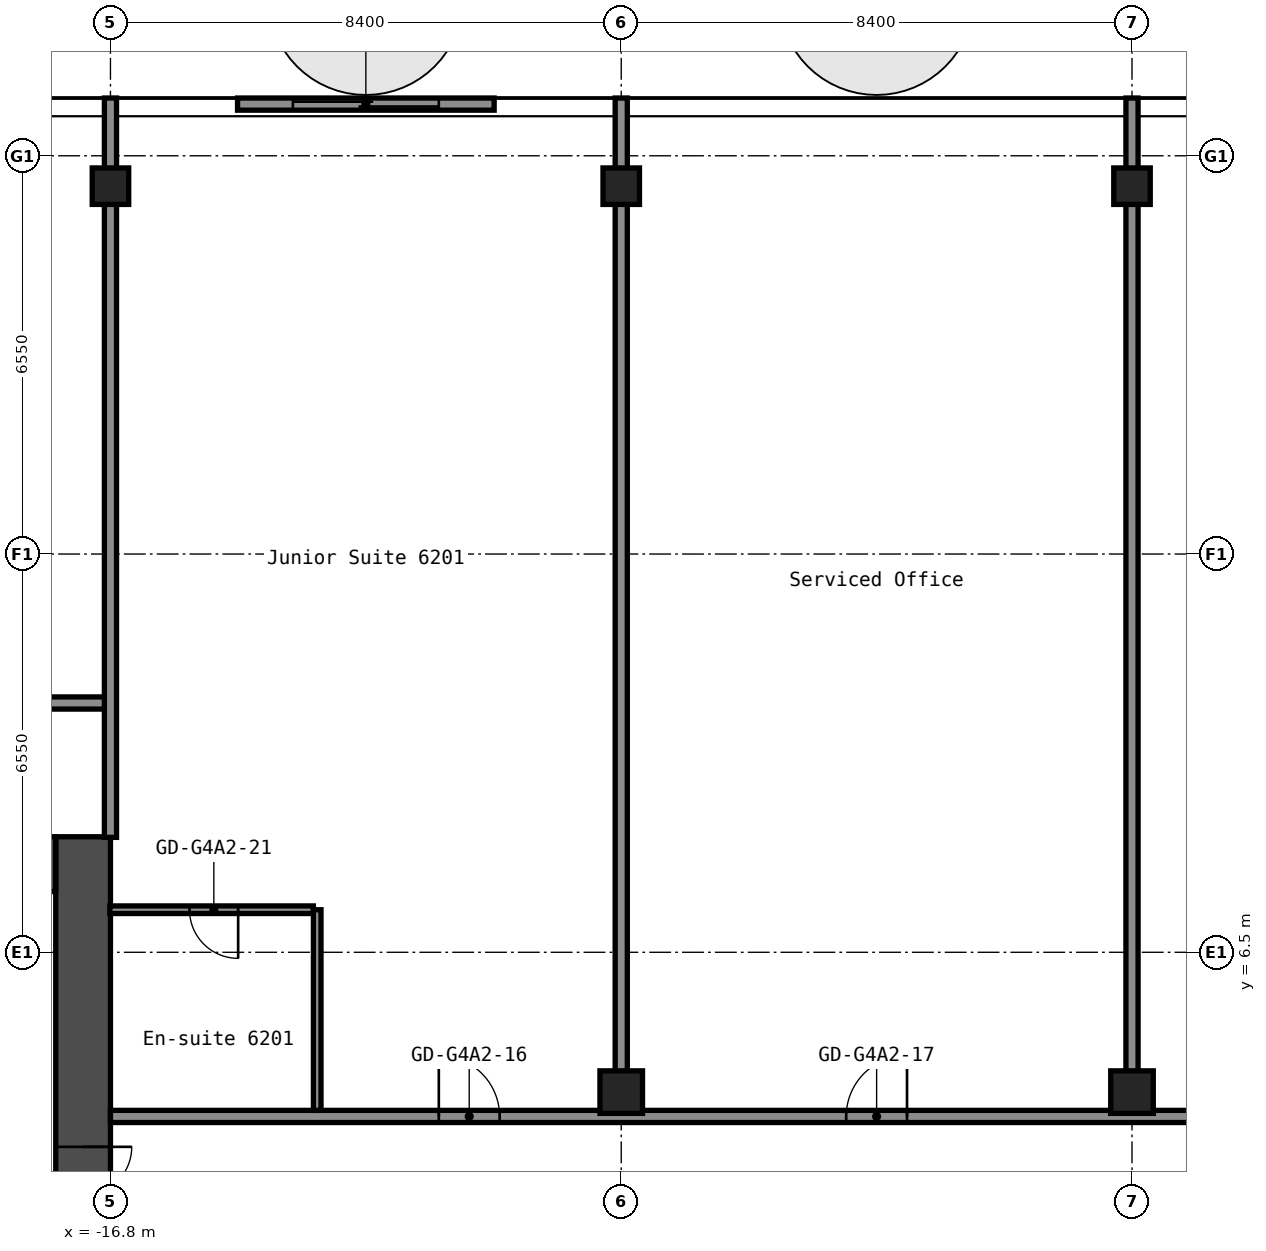
"""IFC4 building model, lengths in metres.
Left out: names, types, materials, properties, quantities, classifications, styles, units other than length and angle.
Written with IfcOpenShell. Run it as: python <this file> out.ifc"""

import sys

from ifc_helpers import new_model, si_unit, direction, frame, frame_2d, origin, origin_2d, place, context, subcontext, project, spatial, rectangle, hollow_rectangle, extrude, element, fill, save


model = new_model("IFC4")
c1 = context("Model", 3, precision=1e-05, world=origin(), true_north=direction((0.0, 1.0)))
c2 = subcontext(c1, "Body", "Model", "MODEL_VIEW")
j1 = project(units=[si_unit("LENGTHUNIT", "METRE"), si_unit("PLANEANGLEUNIT", "RADIAN")], contexts=[c1])
p1 = place(None, origin())
s1 = spatial("IfcSite", under=j1, at=p1, CompositionType="ELEMENT")
p2 = place(p1, origin())
s2 = spatial("IfcBuilding", under=s1, at=p2, CompositionType="ELEMENT")
p3 = place(p2, frame((0.0, 0.0, 218.6)))
s3 = spatial("IfcBuildingStorey", under=s2, at=p3, CompositionType="ELEMENT", Elevation=218.6)
p4 = place(p3, frame((-16.8, 19.1, 0.0), z_axis=(0.0, 0.0, 1.0), x_axis=(1.0, 0.0, 0.0)))
e1 = element("IfcColumn", 1, at=p4, inside=s3, PredefinedType="COLUMN", context=c2, shape_type="SweptSolid", body=[
    extrude(hollow_rectangle(XDim=0.6, YDim=0.6, WallThickness=0.025, InnerFilletRadius=0.038, OuterFilletRadius=0.062, at=origin_2d()), origin(), (0.0, 0.0, 1.0), 2.75),
])
p5 = place(p3, frame((-8.4, 4.2, 0.0), z_axis=(0.0, 0.0, 1.0), x_axis=(1.0, 0.0, 0.0)))
e2 = element("IfcColumn", 2, at=p5, inside=s3, PredefinedType="COLUMN", context=c2, shape_type="SweptSolid", body=[
    extrude(hollow_rectangle(XDim=0.7, YDim=0.7, WallThickness=0.028, at=origin_2d()), origin(), (0.0, 0.0, 1.0), 2.75),
])
p6 = place(p3, frame((-8.4, 19.1, 0.0), z_axis=(0.0, 0.0, 1.0), x_axis=(1.0, 0.0, 0.0)))
e3 = element("IfcColumn", 3, at=p6, inside=s3, PredefinedType="COLUMN", context=c2, shape_type="SweptSolid", body=[
    extrude(hollow_rectangle(XDim=0.6, YDim=0.6, WallThickness=0.025, InnerFilletRadius=0.038, OuterFilletRadius=0.062, at=origin_2d()), origin(), (0.0, 0.0, 1.0), 2.75),
])
p7 = place(p3, frame((0.0, 4.2, 0.0), z_axis=(0.0, 0.0, 1.0), x_axis=(1.0, 0.0, 0.0)))
e4 = element("IfcColumn", 4, at=p7, inside=s3, PredefinedType="COLUMN", context=c2, shape_type="SweptSolid", body=[
    extrude(hollow_rectangle(XDim=0.7, YDim=0.7, WallThickness=0.028, at=origin_2d()), origin(), (0.0, 0.0, 1.0), 2.75),
])
p8 = place(p3, frame((0.0, 19.1, 0.0), z_axis=(0.0, 0.0, 1.0), x_axis=(1.0, 0.0, 0.0)))
e5 = element("IfcColumn", 5, at=p8, inside=s3, PredefinedType="COLUMN", context=c2, shape_type="SweptSolid", body=[
    extrude(hollow_rectangle(XDim=0.6, YDim=0.6, WallThickness=0.025, InnerFilletRadius=0.038, OuterFilletRadius=0.062, at=origin_2d()), origin(), (0.0, 0.0, 1.0), 2.75),
])
p9 = place(p3, frame((-17.25, -8.4, 0.0), z_axis=(0.0, 0.0, 1.0), x_axis=(0.0, 1.0, 0.0)))
e6 = element("IfcWall", 6, at=p9, inside=s3, PredefinedType="SHEAR", context=c2, shape_type="SweptSolid", body=[
    extrude(rectangle(XDim=16.8, YDim=0.9, at=frame_2d((8.4, 0.0))), origin(), (0.0, 0.0, 1.0), 2.75),
])
p10 = place(p9, frame((10.1, 0.0, 0.0)))
e7 = element("IfcOpeningElement", 7, at=p10, cuts=e6, PredefinedType="OPENING", context=c2, shape_type="SweptSolid", body=[
    extrude(rectangle(XDim=1.6, YDim=2.1, at=frame_2d((0.8, 1.05))), frame((0.0, 0.46, 0.0), z_axis=(0.0, -1.0, 0.0), x_axis=(1.0, 0.0, 0.0)), (0.0, 0.0, 1.0), 0.92),
])
p11 = place(p3, frame((-32.7, 7.95, 0.0), z_axis=(0.0, 0.0, 1.0), x_axis=(1.0, 0.0, 0.0)))
e8 = element("IfcWall", 8, at=p11, inside=s3, PredefinedType="SHEAR", context=c2, shape_type="SweptSolid", body=[
    extrude(rectangle(XDim=15.0, YDim=0.9, at=frame_2d((7.5, 0.0))), origin(), (0.0, 0.0, 1.0), 2.75),
])
p12 = place(p11, frame((3.4, 0.0, 0.0)))
e9 = element("IfcOpeningElement", 9, at=p12, cuts=e8, PredefinedType="OPENING", context=c2, shape_type="SweptSolid", body=[
    extrude(rectangle(XDim=1.2, YDim=2.1, at=frame_2d((0.6, 1.05))), frame((0.0, 0.46, 0.0), z_axis=(0.0, -1.0, 0.0), x_axis=(1.0, 0.0, 0.0)), (0.0, 0.0, 1.0), 0.92),
])
p13 = place(p11, frame((0.75, 0.0, 0.0)))
e10 = element("IfcOpeningElement", 10, at=p13, cuts=e8, PredefinedType="OPENING", context=c2, shape_type="SweptSolid", body=[
    extrude(rectangle(XDim=0.9, YDim=2.1, at=frame_2d((0.45, 1.05))), frame((0.0, 0.46, 0.0), z_axis=(0.0, -1.0, 0.0), x_axis=(1.0, 0.0, 0.0)), (0.0, 0.0, 1.0), 0.92),
])
p14 = place(p3, frame((-16.8, 3.8, 0.0), z_axis=(0.0, 0.0, 1.0), x_axis=(1.0, 0.0, 0.0)))
e11 = element("IfcWall", 11, at=p14, inside=s3, PredefinedType="PARTITIONING", context=c2, shape_type="SweptSolid", body=[
    extrude(rectangle(XDim=33.6, YDim=0.2, at=frame_2d((16.8, 0.0))), origin(), (0.0, 0.0, 1.0), 2.75),
])
p15 = place(p14, frame((5.4, 0.0, 0.0)))
e12 = element("IfcOpeningElement", 12, at=p15, cuts=e11, PredefinedType="OPENING", context=c2, shape_type="SweptSolid", body=[
    extrude(rectangle(XDim=1.0, YDim=2.1, at=frame_2d((0.5, 1.05))), frame((0.0, 0.11, 0.0), z_axis=(0.0, -1.0, 0.0), x_axis=(1.0, 0.0, 0.0)), (0.0, 0.0, 1.0), 0.22),
])
p16 = place(p14, frame((12.1, 0.0, 0.0)))
e13 = element("IfcOpeningElement", 13, at=p16, cuts=e11, PredefinedType="OPENING", context=c2, shape_type="SweptSolid", body=[
    extrude(rectangle(XDim=1.0, YDim=2.1, at=frame_2d((0.5, 1.05))), frame((0.0, 0.11, 0.0), z_axis=(0.0, -1.0, 0.0), x_axis=(1.0, 0.0, 0.0)), (0.0, 0.0, 1.0), 0.22),
])
p17 = place(p14, frame((18.87, 0.0, 0.0)))
e14 = element("IfcOpeningElement", 14, at=p17, cuts=e11, PredefinedType="OPENING", context=c2, shape_type="SweptSolid", body=[
    extrude(rectangle(XDim=0.9, YDim=2.1, at=frame_2d((0.45, 1.05))), frame((0.0, 0.11, 0.0), z_axis=(0.0, -1.0, 0.0), x_axis=(1.0, 0.0, 0.0)), (0.0, 0.0, 1.0), 0.22),
])
p18 = place(p14, frame((23.07, 0.0, 0.0)))
e15 = element("IfcOpeningElement", 15, at=p18, cuts=e11, PredefinedType="OPENING", context=c2, shape_type="SweptSolid", body=[
    extrude(rectangle(XDim=0.9, YDim=2.1, at=frame_2d((0.45, 1.05))), frame((0.0, 0.11, 0.0), z_axis=(0.0, -1.0, 0.0), x_axis=(1.0, 0.0, 0.0)), (0.0, 0.0, 1.0), 0.22),
])
p19 = place(p14, frame((30.6, 0.0, 0.0)))
e16 = element("IfcOpeningElement", 16, at=p19, cuts=e11, PredefinedType="OPENING", context=c2, shape_type="SweptSolid", body=[
    extrude(rectangle(XDim=1.0, YDim=2.1, at=frame_2d((0.5, 1.05))), frame((0.0, 0.11, 0.0), z_axis=(0.0, -1.0, 0.0), x_axis=(1.0, 0.0, 0.0)), (0.0, 0.0, 1.0), 0.22),
])
p20 = place(p3, frame((-16.81, 7.2, 0.0), z_axis=(0.0, 0.0, 1.0), x_axis=(1.0, 0.0, 0.0)))
e17 = element("IfcWall", 17, at=p20, inside=s3, PredefinedType="PARTITIONING", context=c2, shape_type="SweptSolid", body=[
    extrude(rectangle(XDim=3.348, YDim=0.125, at=frame_2d((1.674, 0.0))), origin(), (0.0, 0.0, 1.0), 2.75),
])
p21 = place(p20, frame((1.31, 0.0, 0.0)))
e18 = element("IfcOpeningElement", 18, at=p21, cuts=e17, PredefinedType="OPENING", context=c2, shape_type="SweptSolid", body=[
    extrude(rectangle(XDim=0.8, YDim=2.1, at=frame_2d((0.4, 1.05))), frame((0.0, 0.073, 0.0), z_axis=(0.0, -1.0, 0.0), x_axis=(1.0, 0.0, 0.0)), (0.0, 0.0, 1.0), 0.145),
])
p22 = place(p3, frame((-38.1, 10.6, 0.0), z_axis=(0.0, 0.0, 1.0), x_axis=(1.0, 0.0, 0.0)))
e19 = element("IfcWall", 19, at=p22, inside=s3, PredefinedType="PARTITIONING", context=c2, shape_type="SweptSolid", body=[
    extrude(rectangle(XDim=21.3, YDim=0.2, at=frame_2d((10.65, 0.0))), origin(), (0.0, 0.0, 1.0), 2.75),
])
p23 = place(p22, frame((1.95, 0.0, 0.0)))
e20 = element("IfcOpeningElement", 20, at=p23, cuts=e19, PredefinedType="OPENING", context=c2, shape_type="SweptSolid", body=[
    extrude(rectangle(XDim=0.9, YDim=2.1, at=frame_2d((0.45, 1.05))), frame((0.0, 0.11, 0.0), z_axis=(0.0, -1.0, 0.0), x_axis=(1.0, 0.0, 0.0)), (0.0, 0.0, 1.0), 0.22),
])
p24 = place(p22, frame((9.9, 0.0, 0.0)))
e21 = element("IfcOpeningElement", 21, at=p24, cuts=e19, PredefinedType="OPENING", context=c2, shape_type="SweptSolid", body=[
    extrude(rectangle(XDim=1.0, YDim=2.1, at=frame_2d((0.5, 1.05))), frame((0.0, 0.11, 0.0), z_axis=(0.0, -1.0, 0.0), x_axis=(1.0, 0.0, 0.0)), (0.0, 0.0, 1.0), 0.22),
])
p25 = place(p22, frame((18.3, 0.0, 0.0)))
e22 = element("IfcOpeningElement", 22, at=p25, cuts=e19, PredefinedType="OPENING", context=c2, shape_type="SweptSolid", body=[
    extrude(rectangle(XDim=1.0, YDim=2.1, at=frame_2d((0.5, 1.05))), frame((0.0, 0.11, 0.0), z_axis=(0.0, -1.0, 0.0), x_axis=(1.0, 0.0, 0.0)), (0.0, 0.0, 1.0), 0.22),
])
p26 = place(p3, frame((-16.8, 8.39, 0.0), z_axis=(0.0, 0.0, 1.0), x_axis=(0.0, 1.0, 0.0)))
e23 = element("IfcWall", 23, at=p26, inside=s3, PredefinedType="PARTITIONING", context=c2, shape_type="SweptSolid", body=[
    extrude(rectangle(XDim=12.16, YDim=0.2, at=frame_2d((6.08, 0.0))), origin(), (0.0, 0.0, 1.0), 2.75),
])
p27 = place(p3, frame((-13.4, 3.9, 0.0), z_axis=(0.0, 0.0, 1.0), x_axis=(0.0, 1.0, 0.0)))
e24 = element("IfcWall", 24, at=p27, inside=s3, PredefinedType="PARTITIONING", context=c2, shape_type="SweptSolid", body=[
    extrude(rectangle(XDim=3.3, YDim=0.125, at=frame_2d((1.65, 0.0))), origin(), (0.0, 0.0, 1.0), 2.75),
])
for number, where, z_axis, x_axis in (
    (25, (-8.4, 4.54, 0.0), (0.0, 0.0, 1.0), (0.0, 1.0, 0.0)),
    (26, (0.0, 4.54, 0.0), (0.0, 0.0, 1.0), (0.0, 1.0, 0.0)),
):
    element("IfcWall", number, at=place(p3, frame(where, z_axis=z_axis, x_axis=x_axis)), inside=s3, PredefinedType="PARTITIONING", context=c2, shape_type="SweptSolid", body=[
        extrude(rectangle(XDim=16.01, YDim=0.2, at=frame_2d((8.005, 0.0))), origin(), (0.0, 0.0, 1.0), 2.75),
    ])
p28 = place(p3, frame((-10.49, 20.45, 0.0), z_axis=(0.0, 0.0, 1.0), x_axis=(-1.0, 0.0, 0.0)))
p29 = place(p28, frame((0.91, 0.0, 0.0)))
p30 = place(p29, frame((2.4, 0.0, 0.0), z_axis=(0.0, 0.0, 1.0), x_axis=(-1.0, 0.0, 0.0)))
e27 = element("IfcDoor", 27, at=p30, inside=s3, OperationType="SLIDING_TO_LEFT", PredefinedType="DOOR", context=c2, shape_type="SweptSolid", body=[
    extrude(rectangle(XDim=2.4, YDim=2.2, at=frame_2d((1.2, 1.1))), frame((0.0, 0.025, 0.0), z_axis=(0.0, -1.0, 0.0), x_axis=(1.0, 0.0, 0.0)), (0.0, 0.0, 1.0), 0.05),
])
p31 = place(p10, origin())
e28 = element("IfcDoor", 28, at=p31, inside=s3, OperationType="DOUBLE_DOOR_SINGLE_SWING", PredefinedType="DOOR", context=c2, shape_type="SweptSolid", body=[
    extrude(rectangle(XDim=1.6, YDim=2.1, at=frame_2d((0.8, 1.05))), frame((0.0, 0.025, 0.0), z_axis=(0.0, -1.0, 0.0), x_axis=(1.0, 0.0, 0.0)), (0.0, 0.0, 1.0), 0.05),
])
fill(e7, e28)
p32 = place(p15, origin())
e29 = element("IfcDoor", 29, at=p32, inside=s3, OperationType="SINGLE_SWING_RIGHT", PredefinedType="DOOR", context=c2, shape_type="SweptSolid", body=[
    extrude(rectangle(XDim=1.0, YDim=2.1, at=frame_2d((0.5, 1.05))), frame((0.0, 0.025, 0.0), z_axis=(0.0, -1.0, 0.0), x_axis=(1.0, 0.0, 0.0)), (0.0, 0.0, 1.0), 0.05),
])
fill(e12, e29)
p33 = place(p16, origin())
e30 = element("IfcDoor", 30, at=p33, inside=s3, OperationType="SINGLE_SWING_LEFT", PredefinedType="DOOR", context=c2, shape_type="SweptSolid", body=[
    extrude(rectangle(XDim=1.0, YDim=2.1, at=frame_2d((0.5, 1.05))), frame((0.0, 0.025, 0.0), z_axis=(0.0, -1.0, 0.0), x_axis=(1.0, 0.0, 0.0)), (0.0, 0.0, 1.0), 0.05),
])
fill(e13, e30)
p34 = place(p21, origin())
e31 = element("IfcDoor", 31, at=p34, inside=s3, OperationType="SINGLE_SWING_RIGHT", PredefinedType="DOOR", context=c2, shape_type="SweptSolid", body=[
    extrude(rectangle(XDim=0.8, YDim=2.1, at=frame_2d((0.4, 1.05))), frame((0.0, 0.025, 0.0), z_axis=(0.0, -1.0, 0.0), x_axis=(1.0, 0.0, 0.0)), (0.0, 0.0, 1.0), 0.05),
])
fill(e18, e31)
save(model, sys.argv[1])
